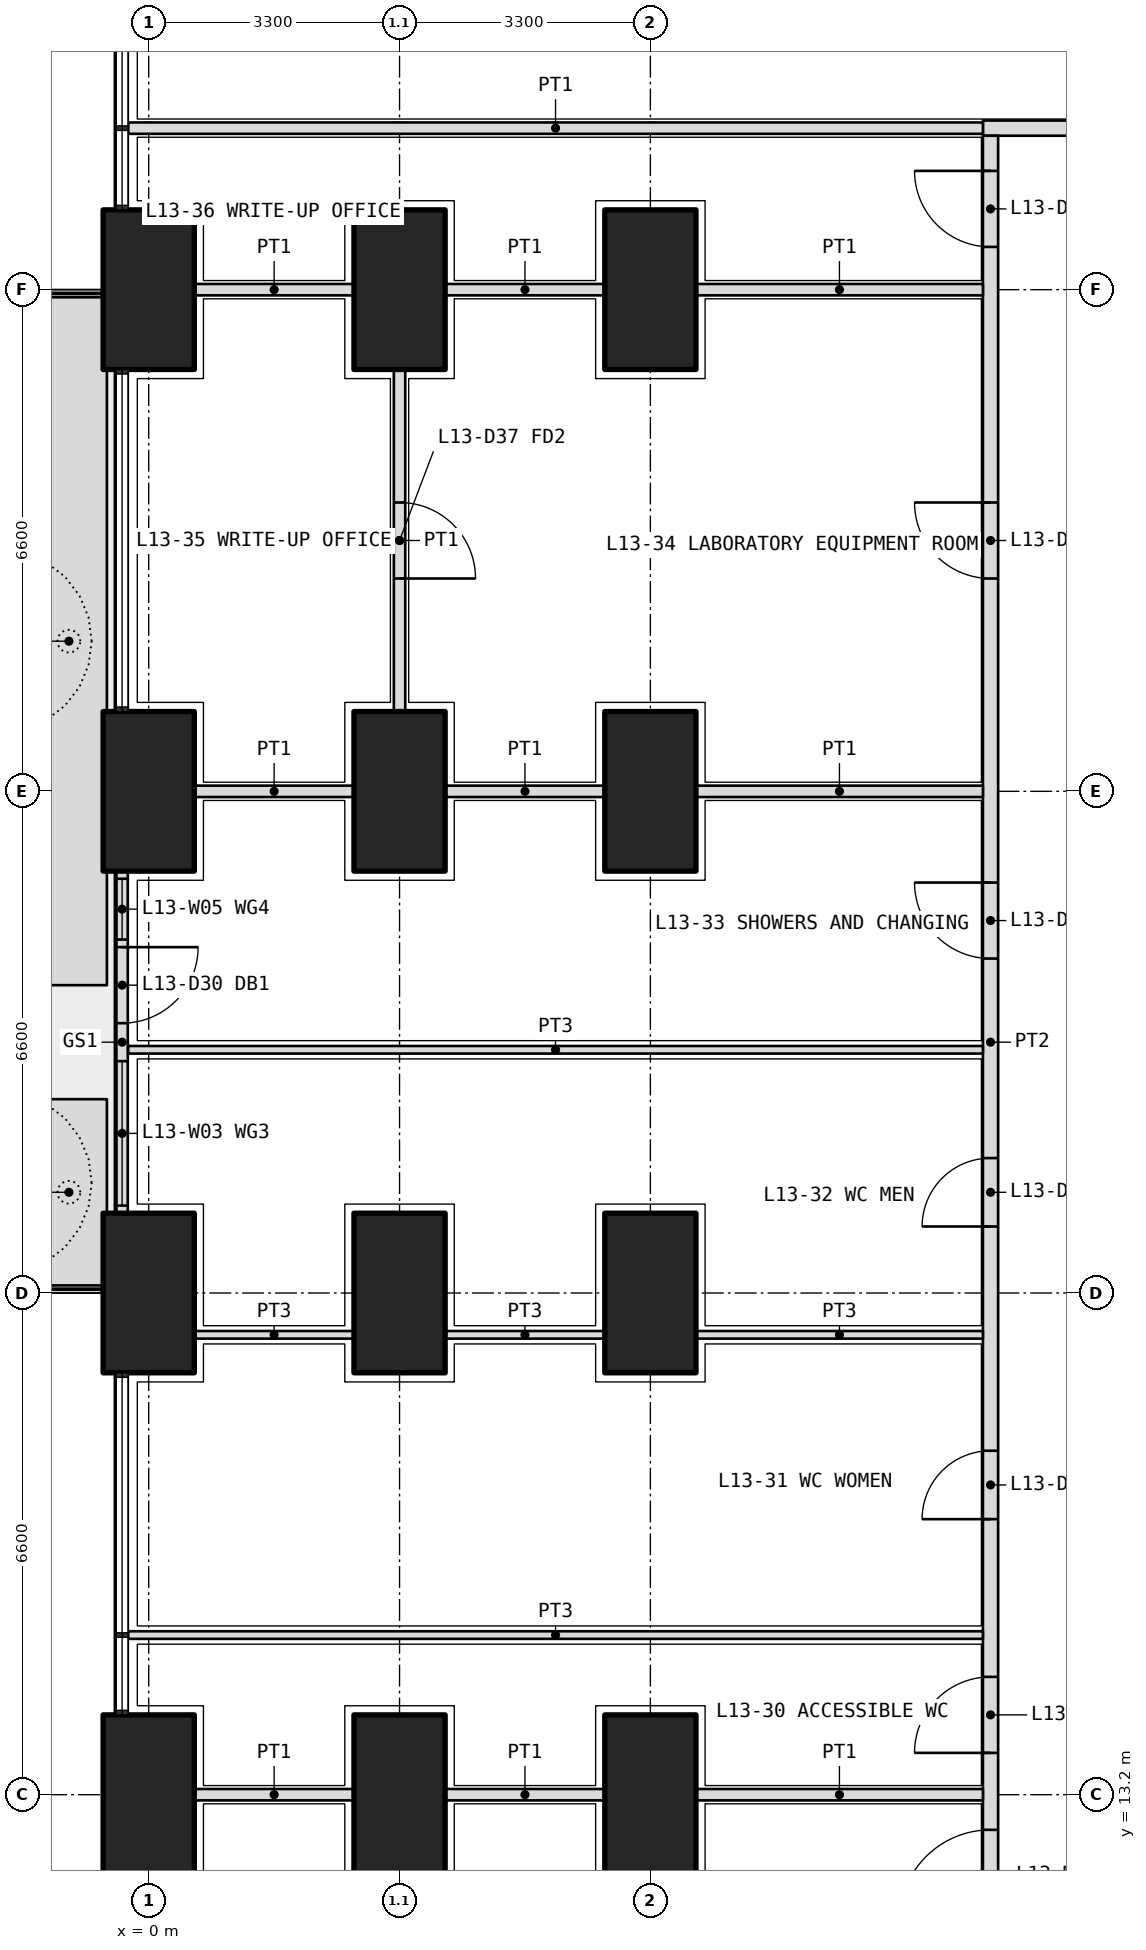
"""IFC4 building model, lengths in metres.
Left out: names, types, materials, properties, quantities, classifications, styles, units other than length and angle.
Written with IfcOpenShell. Run it as: python <this file> out.ifc"""

import sys

from ifc_helpers import new_model, si_unit, direction, frame, frame_2d, origin, origin_2d, place, context, subcontext, project, spatial, polyline, rectangle, outline, extrude, element, fill, save


model = new_model("IFC4")
c1 = context("Model", 3, precision=1e-05, world=origin(), true_north=direction((0.0, 1.0)))
c2 = subcontext(c1, "Body", "Model", "MODEL_VIEW")
j1 = project(units=[si_unit("LENGTHUNIT", "METRE"), si_unit("PLANEANGLEUNIT", "RADIAN")], contexts=[c1])
p1 = place(None, origin())
s1 = spatial("IfcSite", under=j1, at=p1, CompositionType="ELEMENT")
p2 = place(p1, origin())
s2 = spatial("IfcBuilding", under=s1, at=p2, CompositionType="ELEMENT")
p3 = place(p2, frame((0.0, 0.0, 59.1)))
s3 = spatial("IfcBuildingStorey", under=s2, at=p3, CompositionType="ELEMENT", Elevation=59.1)
for number, where, z_axis, x_axis in (
    (1, (0.0, 13.2, 0.0), (0.0, 0.0, 1.0), (0.0, 1.0, 0.0)),
    (2, (0.0, 19.8, 0.0), (0.0, 0.0, 1.0), (0.0, 1.0, 0.0)),
    (3, (0.0, 26.4, 0.0), (0.0, 0.0, 1.0), (0.0, 1.0, 0.0)),
    (4, (0.0, 33.0, 0.0), (0.0, 0.0, 1.0), (0.0, 1.0, 0.0)),
    (5, (3.3, 13.2, 0.0), (0.0, 0.0, 1.0), (0.0, 1.0, 0.0)),
    (6, (3.3, 19.8, 0.0), (0.0, 0.0, 1.0), (0.0, 1.0, 0.0)),
    (7, (3.3, 26.4, 0.0), (0.0, 0.0, 1.0), (0.0, 1.0, 0.0)),
    (8, (3.3, 33.0, 0.0), (0.0, 0.0, 1.0), (0.0, 1.0, 0.0)),
    (9, (6.6, 13.2, 0.0), (0.0, 0.0, 1.0), (0.0, 1.0, 0.0)),
    (10, (6.6, 19.8, 0.0), (0.0, 0.0, 1.0), (0.0, 1.0, 0.0)),
    (11, (6.6, 26.4, 0.0), (0.0, 0.0, 1.0), (0.0, 1.0, 0.0)),
    (12, (6.6, 33.0, 0.0), (0.0, 0.0, 1.0), (0.0, 1.0, 0.0)),
):
    element("IfcColumn", number, at=place(p3, frame(where, z_axis=z_axis, x_axis=x_axis)), inside=s3, PredefinedType="COLUMN", context=c2, shape_type="SweptSolid", body=[
        extrude(rectangle(XDim=2.1, YDim=1.2, at=origin_2d()), origin(), (0.0, 0.0, 1.0), 4.2),
    ])
p4 = place(p3, origin())
e13 = element("IfcWall", 13, at=p4, inside=s3, PredefinedType="USERDEFINED", context=c2, shape_type="SweptSolid", body=[
    extrude(outline(polyline([(-1.55, 19.9), (-0.55, 19.9), (-0.55, 22.35), (-1.55, 22.35), (-1.55, 19.9)]), holes=[polyline([(-1.4, 20.05), (-0.7, 20.05), (-0.7, 22.2), (-1.4, 22.2), (-1.4, 20.05)])]), origin(), (0.0, 0.0, 1.0), 1.05),
])
p5 = place(p3, origin())
e14 = element("IfcWall", 14, at=p5, inside=s3, PredefinedType="USERDEFINED", context=c2, shape_type="SweptSolid", body=[
    extrude(outline(polyline([(-1.55, 23.85), (-0.55, 23.85), (-0.55, 32.9), (-1.55, 32.9), (-1.55, 23.85)]), holes=[polyline([(-1.4, 24.0), (-0.7, 24.0), (-0.7, 32.75), (-1.4, 32.75), (-1.4, 24.0)])]), origin(), (0.0, 0.0, 1.0), 1.05),
])
p6 = place(p3, frame((-0.35, 25.35, 0.0), z_axis=(0.0, 0.0, 1.0), x_axis=(0.0, -1.0, 0.0)))
e15 = element("IfcWall", 15, at=p6, inside=s3, PredefinedType="SOLIDWALL", context=c2, shape_type="SweptSolid", body=[
    extrude(rectangle(XDim=4.5, YDim=0.15, at=frame_2d((2.25, 0.0))), origin(), (0.0, 0.0, 1.0), 2.7),
])
p7 = place(p6, frame((1.0, 0.0, 0.0)))
e16 = element("IfcOpeningElement", 16, at=p7, cuts=e15, PredefinedType="OPENING", context=c2, shape_type="SweptSolid", body=[
    extrude(rectangle(XDim=1.0, YDim=2.4, at=frame_2d((0.5, 1.2))), frame((0.0, 0.085, 0.0), z_axis=(0.0, -1.0, 0.0), x_axis=(1.0, 0.0, 0.0)), (0.0, 0.0, 1.0), 0.17),
])
p8 = place(p6, frame((0.1, 0.0, 0.1)))
e17 = element("IfcOpeningElement", 17, at=p8, cuts=e15, PredefinedType="OPENING", context=c2, shape_type="SweptSolid", body=[
    extrude(rectangle(XDim=0.8, YDim=2.3, at=frame_2d((0.4, 1.15))), frame((0.0, 0.085, 0.0), z_axis=(0.0, -1.0, 0.0), x_axis=(1.0, 0.0, 0.0)), (0.0, 0.0, 1.0), 0.17),
])
p9 = place(p6, frame((2.5, 0.0, 0.1)))
e18 = element("IfcOpeningElement", 18, at=p9, cuts=e15, PredefinedType="OPENING", context=c2, shape_type="SweptSolid", body=[
    extrude(rectangle(XDim=1.9, YDim=2.3, at=frame_2d((0.95, 1.15))), frame((0.0, 0.085, 0.0), z_axis=(0.0, -1.0, 0.0), x_axis=(1.0, 0.0, 0.0)), (0.0, 0.0, 1.0), 0.17),
])
p10 = place(p3, frame((10.975, 35.125, 0.0), z_axis=(0.0, 0.0, 1.0), x_axis=(1.0, 0.0, 0.0)))
e19 = element("IfcWall", 19, at=p10, inside=s3, PredefinedType="PARTITIONING", context=c2, shape_type="SweptSolid", body=[
    extrude(rectangle(XDim=30.85, YDim=0.2, at=frame_2d((15.425, 0.0))), origin(), (0.0, 0.0, 1.0), 2.85),
])
p11 = place(p10, frame((2.312, 0.0, 0.0)))
e20 = element("IfcOpeningElement", 20, at=p11, cuts=e19, PredefinedType="OPENING", context=c2, shape_type="SweptSolid", body=[
    extrude(rectangle(XDim=1.0, YDim=2.1, at=frame_2d((0.5, 1.05))), frame((0.0, 0.11, 0.0), z_axis=(0.0, -1.0, 0.0), x_axis=(1.0, 0.0, 0.0)), (0.0, 0.0, 1.0), 0.22),
])
p12 = place(p10, frame((13.175, 0.0, 0.0)))
e21 = element("IfcOpeningElement", 21, at=p12, cuts=e19, PredefinedType="OPENING", context=c2, shape_type="SweptSolid", body=[
    extrude(rectangle(XDim=1.2, YDim=2.1, at=frame_2d((0.6, 1.05))), frame((0.0, 0.11, 0.0), z_axis=(0.0, -1.0, 0.0), x_axis=(1.0, 0.0, 0.0)), (0.0, 0.0, 1.0), 0.22),
])
p13 = place(p10, frame((25.788, 0.0, 0.0)))
e22 = element("IfcOpeningElement", 22, at=p13, cuts=e19, PredefinedType="OPENING", context=c2, shape_type="SweptSolid", body=[
    extrude(rectangle(XDim=1.2, YDim=2.1, at=frame_2d((0.6, 1.05))), frame((0.0, 0.11, 0.0), z_axis=(0.0, -1.0, 0.0), x_axis=(1.0, 0.0, 0.0)), (0.0, 0.0, 1.0), 0.22),
])
p14 = place(p3, frame((11.075, 11.175, 0.0), z_axis=(0.0, 0.0, 1.0), x_axis=(0.0, 1.0, 0.0)))
e23 = element("IfcWall", 23, at=p14, inside=s3, PredefinedType="PARTITIONING", context=c2, shape_type="SweptSolid", body=[
    extrude(rectangle(XDim=23.85, YDim=0.2, at=frame_2d((11.925, 0.0))), origin(), (0.0, 0.0, 1.0), 2.85),
])
p15 = place(p14, frame((0.363, 0.0, 0.0)))
e24 = element("IfcOpeningElement", 24, at=p15, cuts=e23, PredefinedType="OPENING", context=c2, shape_type="SweptSolid", body=[
    extrude(rectangle(XDim=1.2, YDim=2.1, at=frame_2d((0.6, 1.05))), frame((0.0, 0.11, 0.0), z_axis=(0.0, -1.0, 0.0), x_axis=(1.0, 0.0, 0.0)), (0.0, 0.0, 1.0), 0.22),
])
p16 = place(p14, frame((2.575, 0.0, 0.0)))
e25 = element("IfcOpeningElement", 25, at=p16, cuts=e23, PredefinedType="OPENING", context=c2, shape_type="SweptSolid", body=[
    extrude(rectangle(XDim=1.0, YDim=2.1, at=frame_2d((0.5, 1.05))), frame((0.0, 0.11, 0.0), z_axis=(0.0, -1.0, 0.0), x_axis=(1.0, 0.0, 0.0)), (0.0, 0.0, 1.0), 0.22),
])
p17 = place(p14, frame((5.65, 0.0, 0.0)))
e26 = element("IfcOpeningElement", 26, at=p17, cuts=e23, PredefinedType="OPENING", context=c2, shape_type="SweptSolid", body=[
    extrude(rectangle(XDim=0.9, YDim=2.1, at=frame_2d((0.45, 1.05))), frame((0.0, 0.11, 0.0), z_axis=(0.0, -1.0, 0.0), x_axis=(1.0, 0.0, 0.0)), (0.0, 0.0, 1.0), 0.22),
])
p18 = place(p14, frame((9.5, 0.0, 0.0)))
e27 = element("IfcOpeningElement", 27, at=p18, cuts=e23, PredefinedType="OPENING", context=c2, shape_type="SweptSolid", body=[
    extrude(rectangle(XDim=0.9, YDim=2.1, at=frame_2d((0.45, 1.05))), frame((0.0, 0.11, 0.0), z_axis=(0.0, -1.0, 0.0), x_axis=(1.0, 0.0, 0.0)), (0.0, 0.0, 1.0), 0.22),
])
p19 = place(p14, frame((13.025, 0.0, 0.0)))
e28 = element("IfcOpeningElement", 28, at=p19, cuts=e23, PredefinedType="OPENING", context=c2, shape_type="SweptSolid", body=[
    extrude(rectangle(XDim=1.0, YDim=2.1, at=frame_2d((0.5, 1.05))), frame((0.0, 0.11, 0.0), z_axis=(0.0, -1.0, 0.0), x_axis=(1.0, 0.0, 0.0)), (0.0, 0.0, 1.0), 0.22),
])
p20 = place(p14, frame((18.025, 0.0, 0.0)))
e29 = element("IfcOpeningElement", 29, at=p20, cuts=e23, PredefinedType="OPENING", context=c2, shape_type="SweptSolid", body=[
    extrude(rectangle(XDim=1.0, YDim=2.1, at=frame_2d((0.5, 1.05))), frame((0.0, 0.11, 0.0), z_axis=(0.0, -1.0, 0.0), x_axis=(1.0, 0.0, 0.0)), (0.0, 0.0, 1.0), 0.22),
])
p21 = place(p14, frame((22.387, 0.0, 0.0)))
e30 = element("IfcOpeningElement", 30, at=p21, cuts=e23, PredefinedType="OPENING", context=c2, shape_type="SweptSolid", body=[
    extrude(rectangle(XDim=1.0, YDim=2.1, at=frame_2d((0.5, 1.05))), frame((0.0, 0.11, 0.0), z_axis=(0.0, -1.0, 0.0), x_axis=(1.0, 0.0, 0.0)), (0.0, 0.0, 1.0), 0.22),
])
p22 = place(p3, frame((-0.27, 35.125, 0.0), z_axis=(0.0, 0.0, 1.0), x_axis=(1.0, 0.0, 0.0)))
e31 = element("IfcWall", 31, at=p22, inside=s3, PredefinedType="PARTITIONING", context=c2, shape_type="SweptSolid", body=[
    extrude(rectangle(XDim=11.245, YDim=0.15, at=frame_2d((5.623, 0.0))), origin(), (0.0, 0.0, 1.0), 2.7),
])
p23 = place(p3, frame((3.3, 31.95, 0.0), z_axis=(0.0, 0.0, 1.0), x_axis=(0.0, -1.0, 0.0)))
e32 = element("IfcWall", 32, at=p23, inside=s3, PredefinedType="PARTITIONING", context=c2, shape_type="SweptSolid", body=[
    extrude(rectangle(XDim=4.5, YDim=0.15, at=frame_2d((2.25, 0.0))), origin(), (0.0, 0.0, 1.0), 3.9),
])
p24 = place(p23, frame((1.75, 0.0, 0.0)))
e33 = element("IfcOpeningElement", 33, at=p24, cuts=e32, PredefinedType="OPENING", context=c2, shape_type="SweptSolid", body=[
    extrude(rectangle(XDim=1.0, YDim=2.1, at=frame_2d((0.5, 1.05))), frame((0.0, 0.085, 0.0), z_axis=(0.0, -1.0, 0.0), x_axis=(1.0, 0.0, 0.0)), (0.0, 0.0, 1.0), 0.17),
])
p25 = place(p3, frame((-0.27, 15.3, 0.0), z_axis=(0.0, 0.0, 1.0), x_axis=(1.0, 0.0, 0.0)))
e34 = element("IfcWall", 34, at=p25, inside=s3, PredefinedType="PARTITIONING", context=c2, shape_type="SweptSolid", body=[
    extrude(rectangle(XDim=11.245, YDim=0.1, at=frame_2d((5.623, 0.0))), origin(), (0.0, 0.0, 1.0), 2.7),
])
p26 = place(p3, frame((0.6, 19.25, 0.0), z_axis=(0.0, 0.0, 1.0), x_axis=(1.0, 0.0, 0.0)))
e35 = element("IfcWall", 35, at=p26, inside=s3, PredefinedType="PARTITIONING", context=c2, shape_type="SweptSolid", body=[
    extrude(rectangle(XDim=2.1, YDim=0.1, at=frame_2d((1.05, 0.0))), origin(), (0.0, 0.0, 1.0), 2.85),
])
p27 = place(p3, frame((3.9, 19.25, 0.0), z_axis=(0.0, 0.0, 1.0), x_axis=(1.0, 0.0, 0.0)))
e36 = element("IfcWall", 36, at=p27, inside=s3, PredefinedType="PARTITIONING", context=c2, shape_type="SweptSolid", body=[
    extrude(rectangle(XDim=2.1, YDim=0.1, at=frame_2d((1.05, 0.0))), origin(), (0.0, 0.0, 1.0), 2.85),
])
p28 = place(p3, frame((7.2, 19.25, 0.0), z_axis=(0.0, 0.0, 1.0), x_axis=(1.0, 0.0, 0.0)))
e37 = element("IfcWall", 37, at=p28, inside=s3, PredefinedType="PARTITIONING", context=c2, shape_type="SweptSolid", body=[
    extrude(rectangle(XDim=3.775, YDim=0.1, at=frame_2d((1.888, 0.0))), origin(), (0.0, 0.0, 1.0), 2.85),
])
p29 = place(p3, frame((-0.27, 23.0, 0.0), z_axis=(0.0, 0.0, 1.0), x_axis=(1.0, 0.0, 0.0)))
e38 = element("IfcWall", 38, at=p29, inside=s3, PredefinedType="PARTITIONING", context=c2, shape_type="SweptSolid", body=[
    extrude(rectangle(XDim=11.245, YDim=0.1, at=frame_2d((5.623, 0.0))), origin(), (0.0, 0.0, 1.0), 2.7),
])
p30 = place(p3, frame((0.6, 13.2, 0.0), z_axis=(0.0, 0.0, 1.0), x_axis=(1.0, 0.0, 0.0)))
e39 = element("IfcWall", 39, at=p30, inside=s3, PredefinedType="PARTITIONING", context=c2, shape_type="SweptSolid", body=[
    extrude(rectangle(XDim=2.1, YDim=0.15, at=frame_2d((1.05, 0.0))), origin(), (0.0, 0.0, 1.0), 2.85),
])
p31 = place(p3, frame((3.9, 13.2, 0.0), z_axis=(0.0, 0.0, 1.0), x_axis=(1.0, 0.0, 0.0)))
e40 = element("IfcWall", 40, at=p31, inside=s3, PredefinedType="PARTITIONING", context=c2, shape_type="SweptSolid", body=[
    extrude(rectangle(XDim=2.1, YDim=0.15, at=frame_2d((1.05, 0.0))), origin(), (0.0, 0.0, 1.0), 2.85),
])
p32 = place(p3, frame((7.2, 13.2, 0.0), z_axis=(0.0, 0.0, 1.0), x_axis=(1.0, 0.0, 0.0)))
e41 = element("IfcWall", 41, at=p32, inside=s3, PredefinedType="PARTITIONING", context=c2, shape_type="SweptSolid", body=[
    extrude(rectangle(XDim=3.775, YDim=0.15, at=frame_2d((1.888, 0.0))), origin(), (0.0, 0.0, 1.0), 2.85),
])
p33 = place(p3, frame((0.6, 26.4, 0.0), z_axis=(0.0, 0.0, 1.0), x_axis=(1.0, 0.0, 0.0)))
e42 = element("IfcWall", 42, at=p33, inside=s3, PredefinedType="PARTITIONING", context=c2, shape_type="SweptSolid", body=[
    extrude(rectangle(XDim=2.1, YDim=0.15, at=frame_2d((1.05, 0.0))), origin(), (0.0, 0.0, 1.0), 2.85),
])
p34 = place(p3, frame((3.9, 26.4, 0.0), z_axis=(0.0, 0.0, 1.0), x_axis=(1.0, 0.0, 0.0)))
e43 = element("IfcWall", 43, at=p34, inside=s3, PredefinedType="PARTITIONING", context=c2, shape_type="SweptSolid", body=[
    extrude(rectangle(XDim=2.1, YDim=0.15, at=frame_2d((1.05, 0.0))), origin(), (0.0, 0.0, 1.0), 2.85),
])
p35 = place(p3, frame((7.2, 26.4, 0.0), z_axis=(0.0, 0.0, 1.0), x_axis=(1.0, 0.0, 0.0)))
e44 = element("IfcWall", 44, at=p35, inside=s3, PredefinedType="PARTITIONING", context=c2, shape_type="SweptSolid", body=[
    extrude(rectangle(XDim=3.775, YDim=0.15, at=frame_2d((1.888, 0.0))), origin(), (0.0, 0.0, 1.0), 2.85),
])
p36 = place(p3, frame((0.6, 33.0, 0.0), z_axis=(0.0, 0.0, 1.0), x_axis=(1.0, 0.0, 0.0)))
e45 = element("IfcWall", 45, at=p36, inside=s3, PredefinedType="PARTITIONING", context=c2, shape_type="SweptSolid", body=[
    extrude(rectangle(XDim=2.1, YDim=0.15, at=frame_2d((1.05, 0.0))), origin(), (0.0, 0.0, 1.0), 2.85),
])
p37 = place(p3, frame((3.9, 33.0, 0.0), z_axis=(0.0, 0.0, 1.0), x_axis=(1.0, 0.0, 0.0)))
e46 = element("IfcWall", 46, at=p37, inside=s3, PredefinedType="PARTITIONING", context=c2, shape_type="SweptSolid", body=[
    extrude(rectangle(XDim=2.1, YDim=0.15, at=frame_2d((1.05, 0.0))), origin(), (0.0, 0.0, 1.0), 2.85),
])
p38 = place(p3, frame((7.2, 33.0, 0.0), z_axis=(0.0, 0.0, 1.0), x_axis=(1.0, 0.0, 0.0)))
e47 = element("IfcWall", 47, at=p38, inside=s3, PredefinedType="PARTITIONING", context=c2, shape_type="SweptSolid", body=[
    extrude(rectangle(XDim=3.775, YDim=0.15, at=frame_2d((1.888, 0.0))), origin(), (0.0, 0.0, 1.0), 2.85),
])
p39 = place(p7, origin())
e48 = element("IfcDoor", 48, at=p39, inside=s3, OperationType="SINGLE_SWING_LEFT", PredefinedType="DOOR", context=c2, shape_type="SweptSolid", body=[
    extrude(rectangle(XDim=1.0, YDim=2.4, at=frame_2d((0.5, 1.2))), frame((0.0, 0.025, 0.0), z_axis=(0.0, -1.0, 0.0), x_axis=(1.0, 0.0, 0.0)), (0.0, 0.0, 1.0), 0.05),
])
fill(e16, e48)
p40 = place(p8, origin())
e49 = element("IfcWindow", 49, at=p40, inside=s3, PartitioningType="SINGLE_PANEL", PredefinedType="WINDOW", context=c2, shape_type="SweptSolid", body=[
    extrude(rectangle(XDim=0.8, YDim=2.3, at=frame_2d((0.4, 1.15))), frame((0.0, 0.03, 0.0), z_axis=(0.0, -1.0, 0.0), x_axis=(1.0, 0.0, 0.0)), (0.0, 0.0, 1.0), 0.06),
])
fill(e17, e49)
p41 = place(p9, origin())
e50 = element("IfcWindow", 50, at=p41, inside=s3, PartitioningType="SINGLE_PANEL", PredefinedType="WINDOW", context=c2, shape_type="SweptSolid", body=[
    extrude(rectangle(XDim=1.9, YDim=2.3, at=frame_2d((0.95, 1.15))), frame((0.0, 0.03, 0.0), z_axis=(0.0, -1.0, 0.0), x_axis=(1.0, 0.0, 0.0)), (0.0, 0.0, 1.0), 0.06),
])
fill(e18, e50)
p42 = place(p15, origin())
e51 = element("IfcDoor", 51, at=p42, inside=s3, OperationType="DOUBLE_DOOR_SINGLE_SWING", PredefinedType="DOOR", context=c2, shape_type="SweptSolid", body=[
    extrude(rectangle(XDim=1.2, YDim=2.1, at=frame_2d((0.6, 1.05))), frame((0.0, 0.025, 0.0), z_axis=(0.0, -1.0, 0.0), x_axis=(1.0, 0.0, 0.0)), (0.0, 0.0, 1.0), 0.05),
])
fill(e24, e51)
p43 = place(p16, origin())
e52 = element("IfcDoor", 52, at=p43, inside=s3, OperationType="SINGLE_SWING_LEFT", PredefinedType="DOOR", context=c2, shape_type="SweptSolid", body=[
    extrude(rectangle(XDim=1.0, YDim=2.1, at=frame_2d((0.5, 1.05))), frame((0.0, 0.025, 0.0), z_axis=(0.0, -1.0, 0.0), x_axis=(1.0, 0.0, 0.0)), (0.0, 0.0, 1.0), 0.05),
])
fill(e25, e52)
p44 = place(p17, origin())
e53 = element("IfcDoor", 53, at=p44, inside=s3, OperationType="SINGLE_SWING_LEFT", PredefinedType="DOOR", context=c2, shape_type="SweptSolid", body=[
    extrude(rectangle(XDim=0.9, YDim=2.1, at=frame_2d((0.45, 1.05))), frame((0.0, 0.025, 0.0), z_axis=(0.0, -1.0, 0.0), x_axis=(1.0, 0.0, 0.0)), (0.0, 0.0, 1.0), 0.05),
])
fill(e26, e53)
p45 = place(p18, origin())
e54 = element("IfcDoor", 54, at=p45, inside=s3, OperationType="SINGLE_SWING_LEFT", PredefinedType="DOOR", context=c2, shape_type="SweptSolid", body=[
    extrude(rectangle(XDim=0.9, YDim=2.1, at=frame_2d((0.45, 1.05))), frame((0.0, 0.025, 0.0), z_axis=(0.0, -1.0, 0.0), x_axis=(1.0, 0.0, 0.0)), (0.0, 0.0, 1.0), 0.05),
])
fill(e27, e54)
p46 = place(p19, origin())
e55 = element("IfcDoor", 55, at=p46, inside=s3, OperationType="SINGLE_SWING_RIGHT", PredefinedType="DOOR", context=c2, shape_type="SweptSolid", body=[
    extrude(rectangle(XDim=1.0, YDim=2.1, at=frame_2d((0.5, 1.05))), frame((0.0, 0.025, 0.0), z_axis=(0.0, -1.0, 0.0), x_axis=(1.0, 0.0, 0.0)), (0.0, 0.0, 1.0), 0.05),
])
fill(e28, e55)
p47 = place(p20, origin())
e56 = element("IfcDoor", 56, at=p47, inside=s3, OperationType="SINGLE_SWING_RIGHT", PredefinedType="DOOR", context=c2, shape_type="SweptSolid", body=[
    extrude(rectangle(XDim=1.0, YDim=2.1, at=frame_2d((0.5, 1.05))), frame((0.0, 0.025, 0.0), z_axis=(0.0, -1.0, 0.0), x_axis=(1.0, 0.0, 0.0)), (0.0, 0.0, 1.0), 0.05),
])
fill(e29, e56)
p48 = place(p24, origin())
e57 = element("IfcDoor", 57, at=p48, inside=s3, OperationType="SINGLE_SWING_RIGHT", PredefinedType="DOOR", context=c2, shape_type="SweptSolid", body=[
    extrude(rectangle(XDim=1.0, YDim=2.1, at=frame_2d((0.5, 1.05))), frame((0.0, 0.025, 0.0), z_axis=(0.0, -1.0, 0.0), x_axis=(1.0, 0.0, 0.0)), (0.0, 0.0, 1.0), 0.05),
])
fill(e33, e57)
p49 = place(p21, origin())
e58 = element("IfcDoor", 58, at=p49, inside=s3, OperationType="SINGLE_SWING_RIGHT", PredefinedType="DOOR", context=c2, shape_type="SweptSolid", body=[
    extrude(rectangle(XDim=1.0, YDim=2.1, at=frame_2d((0.5, 1.05))), frame((0.0, 0.025, 0.0), z_axis=(0.0, -1.0, 0.0), x_axis=(1.0, 0.0, 0.0)), (0.0, 0.0, 1.0), 0.05),
])
fill(e30, e58)
save(model, sys.argv[1])
